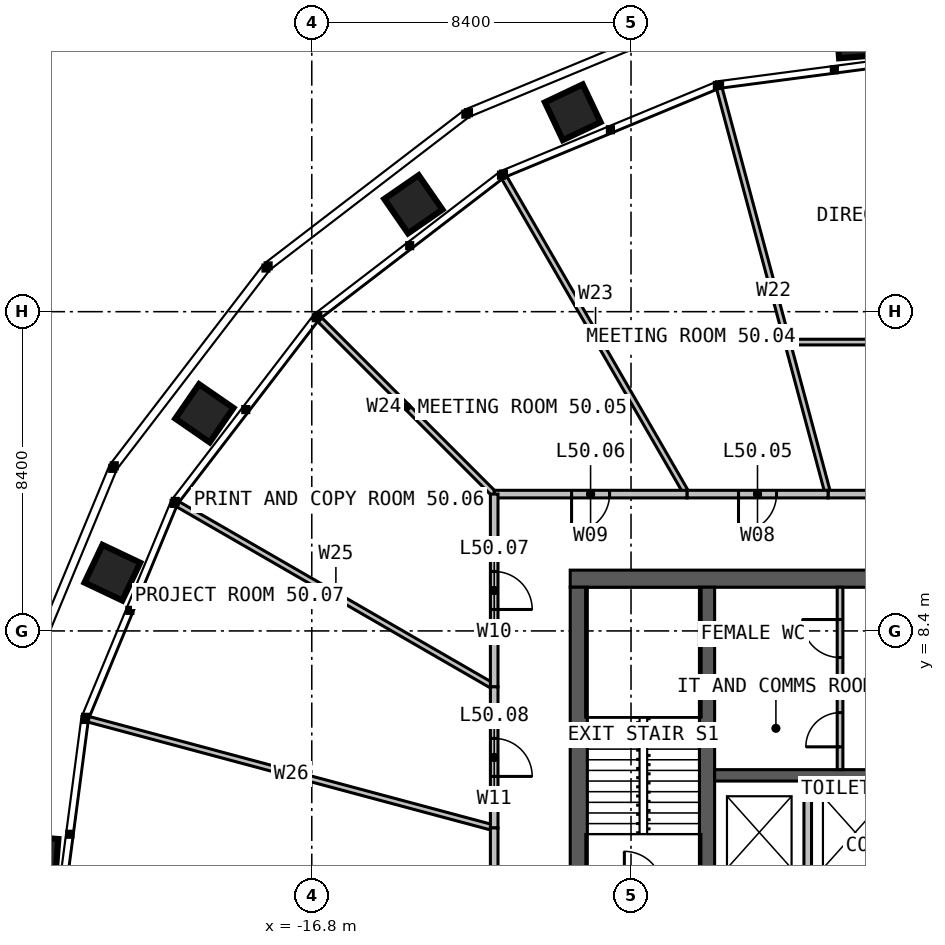
"""IFC4 building model, lengths in metres.
Left out: names, types, materials, properties, quantities, classifications, styles, units other than length and angle.
Written with IfcOpenShell. Run it as: python <this file> out.ifc"""

import sys

from ifc_helpers import new_model, si_unit, direction, frame, frame_2d, origin, place, context, subcontext, project, spatial, rectangle, extrude, element, fill, save


model = new_model("IFC4")
c1 = context("Model", 3, precision=1e-05, world=origin(), true_north=direction((0.0, 1.0)))
c2 = subcontext(c1, "Body", "Model", "MODEL_VIEW")
j1 = project(units=[si_unit("LENGTHUNIT", "METRE"), si_unit("PLANEANGLEUNIT", "RADIAN")], contexts=[c1])
p1 = place(None, origin())
s1 = spatial("IfcSite", under=j1, at=p1, CompositionType="ELEMENT")
p2 = place(p1, origin())
s2 = spatial("IfcBuilding", under=s1, at=p2, CompositionType="ELEMENT")
p3 = place(p2, frame((0.0, 0.0, 207.0)))
s3 = spatial("IfcBuildingStorey", under=s2, at=p3, CompositionType="ELEMENT", Elevation=207.0)
p4 = place(p3, frame((-10.0, 9.775, 0.0), z_axis=(0.0, 0.0, 1.0), x_axis=(1.0, 0.0, 0.0)))
e1 = element("IfcWall", 1, at=p4, inside=s3, PredefinedType="SOLIDWALL", context=c2, shape_type="SweptSolid", body=[
    extrude(rectangle(XDim=20.0, YDim=0.45, at=frame_2d((10.0, 0.0))), origin(), (0.0, 0.0, 1.0), 4.0),
])
p5 = place(p4, frame((9.4, 0.0, 0.0)))
e2 = element("IfcOpeningElement", 2, at=p5, cuts=e1, PredefinedType="OPENING", context=c2, shape_type="SweptSolid", body=[
    extrude(rectangle(XDim=1.2, YDim=2.2, at=frame_2d((0.6, 1.1))), frame((0.0, 0.235, 0.0), z_axis=(0.0, -1.0, 0.0), x_axis=(1.0, 0.0, 0.0)), (0.0, 0.0, 1.0), 0.47),
])
p6 = place(p3, frame((-9.775, 9.55, 0.0), z_axis=(0.0, 0.0, 1.0), x_axis=(0.0, -1.0, 0.0)))
e3 = element("IfcWall", 3, at=p6, inside=s3, PredefinedType="SOLIDWALL", context=c2, shape_type="SweptSolid", body=[
    extrude(rectangle(XDim=19.1, YDim=0.45, at=frame_2d((9.55, 0.0))), origin(), (0.0, 0.0, 1.0), 4.0),
])
p7 = place(p3, frame((-6.4, -9.55, 0.0), z_axis=(0.0, 0.0, 1.0), x_axis=(0.0, 1.0, 0.0)))
e4 = element("IfcWall", 4, at=p7, inside=s3, PredefinedType="SOLIDWALL", context=c2, shape_type="SweptSolid", body=[
    extrude(rectangle(XDim=19.1, YDim=0.4, at=frame_2d((9.55, 0.0))), origin(), (0.0, 0.0, 1.0), 4.0),
])
p8 = place(p7, frame((9.05, 0.0, 0.0)))
e5 = element("IfcOpeningElement", 5, at=p8, cuts=e4, PredefinedType="OPENING", context=c2, shape_type="SweptSolid", body=[
    extrude(rectangle(XDim=1.0, YDim=2.2, at=frame_2d((0.5, 1.1))), frame((0.0, 0.21, 0.0), z_axis=(0.0, -1.0, 0.0), x_axis=(1.0, 0.0, 0.0)), (0.0, 0.0, 1.0), 0.42),
])
p9 = place(p3, frame((-6.2, 4.6, 0.0), z_axis=(0.0, 0.0, 1.0), x_axis=(1.0, 0.0, 0.0)))
e6 = element("IfcWall", 6, at=p9, inside=s3, PredefinedType="SOLIDWALL", context=c2, shape_type="SweptSolid", body=[
    extrude(rectangle(XDim=4.85, YDim=0.3, at=frame_2d((2.425, 0.0))), origin(), (0.0, 0.0, 1.0), 4.0),
])
p10 = place(p3, frame((-3.75, 1.75, 0.0), z_axis=(0.0, 0.0, 1.0), x_axis=(0.0, 1.0, 0.0)))
e7 = element("IfcWall", 7, at=p10, inside=s3, PredefinedType="SOLIDWALL", context=c2, shape_type="SweptSolid", body=[
    extrude(rectangle(XDim=2.7, YDim=0.2, at=frame_2d((1.35, 0.0))), origin(), (0.0, 0.0, 1.0), 3.75),
])
p11 = place(p3, frame((-2.9, 4.75, 0.0), z_axis=(0.0, 0.0, 1.0), x_axis=(0.0, 1.0, 0.0)))
e8 = element("IfcWall", 8, at=p11, inside=s3, PredefinedType="PARTITIONING", context=c2, shape_type="SweptSolid", body=[
    extrude(rectangle(XDim=4.8, YDim=0.15, at=frame_2d((2.4, 0.0))), origin(), (0.0, 0.0, 1.0), 3.75),
])
p12 = place(p11, frame((2.95, 0.0, 0.0)))
e9 = element("IfcOpeningElement", 9, at=p12, cuts=e8, PredefinedType="OPENING", context=c2, shape_type="SweptSolid", body=[
    extrude(rectangle(XDim=1.0, YDim=2.2, at=frame_2d((0.5, 1.1))), frame((0.0, 0.085, 0.0), z_axis=(0.0, -1.0, 0.0), x_axis=(1.0, 0.0, 0.0)), (0.0, 0.0, 1.0), 0.17),
])
p13 = place(p11, frame((0.6, 0.0, 0.0)))
e10 = element("IfcOpeningElement", 10, at=p13, cuts=e8, PredefinedType="OPENING", context=c2, shape_type="SweptSolid", body=[
    extrude(rectangle(XDim=0.9, YDim=2.2, at=frame_2d((0.45, 1.1))), frame((0.0, 0.085, 0.0), z_axis=(0.0, -1.0, 0.0), x_axis=(1.0, 0.0, 0.0)), (0.0, 0.0, 1.0), 0.17),
])
p14 = place(p3, frame((-6.2, 7.0, 0.0), z_axis=(0.0, 0.0, 1.0), x_axis=(1.0, 0.0, 0.0)))
e11 = element("IfcWall", 11, at=p14, inside=s3, PredefinedType="PARTITIONING", context=c2, shape_type="SweptSolid", body=[
    extrude(rectangle(XDim=3.225, YDim=0.15, at=frame_2d((1.612, 0.0))), origin(), (0.0, 0.0, 1.0), 3.75),
])
p15 = place(p3, frame((-3.215, 12.0, 0.0), z_axis=(0.0, 0.0, 1.0), x_axis=(-0.258831035528, 0.965922613384, 0.0)))
e12 = element("IfcWall", 12, at=p15, inside=s3, PredefinedType="PARTITIONING", context=c2, shape_type="SweptSolid", body=[
    extrude(rectangle(XDim=11.053, YDim=0.15, at=frame_2d((5.526, 0.0))), origin(), (0.0, 0.0, 1.0), 2.79),
])
p16 = place(p3, frame((-6.928, 12.0, 0.0), z_axis=(0.0, 0.0, 1.0), x_axis=(-0.499990471717, 0.866030904871, 0.0)))
e13 = element("IfcWall", 13, at=p16, inside=s3, PredefinedType="PARTITIONING", context=c2, shape_type="SweptSolid", body=[
    extrude(rectangle(XDim=9.62, YDim=0.15, at=frame_2d((4.81, 0.0))), origin(), (0.0, 0.0, 1.0), 2.79),
])
p17 = place(p3, frame((-12.0, 12.0, 0.0), z_axis=(0.0, 0.0, 1.0), x_axis=(-0.707106781187, 0.707106781187, 0.0)))
e14 = element("IfcWall", 14, at=p17, inside=s3, PredefinedType="PARTITIONING", context=c2, shape_type="SweptSolid", body=[
    extrude(rectangle(XDim=6.506, YDim=0.15, at=frame_2d((3.253, 0.0))), origin(), (0.0, 0.0, 1.0), 2.79),
])
p18 = place(p3, frame((-12.0, 6.928, 0.0), z_axis=(0.0, 0.0, 1.0), x_axis=(-0.866030904871, 0.499990471717, 0.0)))
e15 = element("IfcWall", 15, at=p18, inside=s3, PredefinedType="PARTITIONING", context=c2, shape_type="SweptSolid", body=[
    extrude(rectangle(XDim=9.62, YDim=0.15, at=frame_2d((4.81, 0.0))), origin(), (0.0, 0.0, 1.0), 2.79),
])
p19 = place(p3, frame((-12.0, 3.215, 0.0), z_axis=(0.0, 0.0, 1.0), x_axis=(-0.965922613384, 0.258831035528, 0.0)))
e16 = element("IfcWall", 16, at=p19, inside=s3, PredefinedType="PARTITIONING", context=c2, shape_type="SweptSolid", body=[
    extrude(rectangle(XDim=11.053, YDim=0.15, at=frame_2d((5.526, 0.0))), origin(), (0.0, 0.0, 1.0), 2.79),
])
p20 = place(p3, frame((9.238, 16.0, 0.0), z_axis=(0.0, 0.0, 1.0), x_axis=(-1.0, 0.0, 0.0)))
e17 = element("IfcWall", 17, at=p20, inside=s3, PredefinedType="PARTITIONING", context=c2, shape_type="SweptSolid", body=[
    extrude(rectangle(XDim=13.525, YDim=0.15, at=frame_2d((6.762, 0.0))), origin(), (0.0, 0.0, 1.0), 2.79),
])
p21 = place(p20, frame((1.975, 0.0, 0.0)))
e18 = element("IfcOpeningElement", 18, at=p21, cuts=e17, PredefinedType="OPENING", context=c2, shape_type="SweptSolid", body=[
    extrude(rectangle(XDim=1.0, YDim=2.2, at=frame_2d((0.5, 1.1))), frame((0.0, 0.085, 0.0), z_axis=(0.0, -1.0, 0.0), x_axis=(1.0, 0.0, 0.0)), (0.0, 0.0, 1.0), 0.17),
])
p22 = place(p20, frame((8.338, 0.0, 0.0)))
e19 = element("IfcOpeningElement", 19, at=p22, cuts=e17, PredefinedType="OPENING", context=c2, shape_type="SweptSolid", body=[
    extrude(rectangle(XDim=1.8, YDim=2.2, at=frame_2d((0.9, 1.1))), frame((0.0, 0.085, 0.0), z_axis=(0.0, -1.0, 0.0), x_axis=(1.0, 0.0, 0.0)), (0.0, 0.0, 1.0), 0.17),
])
p23 = place(p3, frame((6.928, 12.0, 0.0), z_axis=(0.0, 0.0, 1.0), x_axis=(-1.0, 0.0, 0.0)))
e20 = element("IfcWall", 20, at=p23, inside=s3, PredefinedType="PARTITIONING", context=c2, shape_type="SweptSolid", body=[
    extrude(rectangle(XDim=10.144, YDim=0.2, at=frame_2d((5.072, 0.0))), origin(), (0.0, 0.0, 1.0), 3.8),
])
p24 = place(p23, frame((4.172, 0.0, 0.0)))
e21 = element("IfcOpeningElement", 21, at=p24, cuts=e20, PredefinedType="OPENING", context=c2, shape_type="SweptSolid", body=[
    extrude(rectangle(XDim=1.8, YDim=2.2, at=frame_2d((0.9, 1.1))), frame((0.0, 0.11, 0.0), z_axis=(0.0, -1.0, 0.0), x_axis=(1.0, 0.0, 0.0)), (0.0, 0.0, 1.0), 0.22),
])
p25 = place(p3, frame((-3.215, 12.0, 0.0), z_axis=(0.0, 0.0, 1.0), x_axis=(-1.0, 0.0, 0.0)))
e22 = element("IfcWall", 22, at=p25, inside=s3, PredefinedType="PARTITIONING", context=c2, shape_type="SweptSolid", body=[
    extrude(rectangle(XDim=3.713, YDim=0.2, at=frame_2d((1.856, 0.0))), origin(), (0.0, 0.0, 1.0), 3.8),
])
p26 = place(p25, frame((1.356, 0.0, 0.0)))
e23 = element("IfcOpeningElement", 23, at=p26, cuts=e22, PredefinedType="OPENING", context=c2, shape_type="SweptSolid", body=[
    extrude(rectangle(XDim=1.0, YDim=2.2, at=frame_2d((0.5, 1.1))), frame((0.0, 0.11, 0.0), z_axis=(0.0, -1.0, 0.0), x_axis=(1.0, 0.0, 0.0)), (0.0, 0.0, 1.0), 0.22),
])
p27 = place(p3, frame((-6.928, 12.0, 0.0), z_axis=(0.0, 0.0, 1.0), x_axis=(-1.0, 0.0, 0.0)))
e24 = element("IfcWall", 24, at=p27, inside=s3, PredefinedType="PARTITIONING", context=c2, shape_type="SweptSolid", body=[
    extrude(rectangle(XDim=5.072, YDim=0.2, at=frame_2d((2.536, 0.0))), origin(), (0.0, 0.0, 1.0), 3.8),
])
p28 = place(p27, frame((2.036, 0.0, 0.0)))
e25 = element("IfcOpeningElement", 25, at=p28, cuts=e24, PredefinedType="OPENING", context=c2, shape_type="SweptSolid", body=[
    extrude(rectangle(XDim=1.0, YDim=2.2, at=frame_2d((0.5, 1.1))), frame((0.0, 0.11, 0.0), z_axis=(0.0, -1.0, 0.0), x_axis=(1.0, 0.0, 0.0)), (0.0, 0.0, 1.0), 0.22),
])
p29 = place(p3, frame((-12.0, 12.0, 0.0), z_axis=(0.0, 0.0, 1.0), x_axis=(0.0, -1.0, 0.0)))
e26 = element("IfcWall", 26, at=p29, inside=s3, PredefinedType="PARTITIONING", context=c2, shape_type="SweptSolid", body=[
    extrude(rectangle(XDim=5.072, YDim=0.2, at=frame_2d((2.536, 0.0))), origin(), (0.0, 0.0, 1.0), 3.8),
])
p30 = place(p29, frame((2.036, 0.0, 0.0)))
e27 = element("IfcOpeningElement", 27, at=p30, cuts=e26, PredefinedType="OPENING", context=c2, shape_type="SweptSolid", body=[
    extrude(rectangle(XDim=1.0, YDim=2.2, at=frame_2d((0.5, 1.1))), frame((0.0, 0.11, 0.0), z_axis=(0.0, -1.0, 0.0), x_axis=(1.0, 0.0, 0.0)), (0.0, 0.0, 1.0), 0.22),
])
p31 = place(p3, frame((-12.0, 6.928, 0.0), z_axis=(0.0, 0.0, 1.0), x_axis=(0.0, -1.0, 0.0)))
e28 = element("IfcWall", 28, at=p31, inside=s3, PredefinedType="PARTITIONING", context=c2, shape_type="SweptSolid", body=[
    extrude(rectangle(XDim=3.713, YDim=0.2, at=frame_2d((1.856, 0.0))), origin(), (0.0, 0.0, 1.0), 3.8),
])
p32 = place(p31, frame((1.356, 0.0, 0.0)))
e29 = element("IfcOpeningElement", 29, at=p32, cuts=e28, PredefinedType="OPENING", context=c2, shape_type="SweptSolid", body=[
    extrude(rectangle(XDim=1.0, YDim=2.2, at=frame_2d((0.5, 1.1))), frame((0.0, 0.11, 0.0), z_axis=(0.0, -1.0, 0.0), x_axis=(1.0, 0.0, 0.0)), (0.0, 0.0, 1.0), 0.22),
])
p33 = place(p3, frame((-12.0, 3.215, 0.0), z_axis=(0.0, 0.0, 1.0), x_axis=(0.0, -1.0, 0.0)))
e30 = element("IfcWall", 30, at=p33, inside=s3, PredefinedType="PARTITIONING", context=c2, shape_type="SweptSolid", body=[
    extrude(rectangle(XDim=10.144, YDim=0.2, at=frame_2d((5.072, 0.0))), origin(), (0.0, 0.0, 1.0), 3.8),
])
p34 = place(p33, frame((4.172, 0.0, 0.0)))
e31 = element("IfcOpeningElement", 31, at=p34, cuts=e30, PredefinedType="OPENING", context=c2, shape_type="SweptSolid", body=[
    extrude(rectangle(XDim=1.8, YDim=2.2, at=frame_2d((0.9, 1.1))), frame((0.0, 0.11, 0.0), z_axis=(0.0, -1.0, 0.0), x_axis=(1.0, 0.0, 0.0)), (0.0, 0.0, 1.0), 0.22),
])
p35 = place(p12, origin())
e32 = element("IfcDoor", 32, at=p35, inside=s3, OperationType="SINGLE_SWING_RIGHT", PredefinedType="DOOR", context=c2, shape_type="SweptSolid", body=[
    extrude(rectangle(XDim=1.0, YDim=2.2, at=frame_2d((0.5, 1.1))), frame((0.0, 0.025, 0.0), z_axis=(0.0, -1.0, 0.0), x_axis=(1.0, 0.0, 0.0)), (0.0, 0.0, 1.0), 0.05),
])
fill(e9, e32)
p36 = place(p13, origin())
e33 = element("IfcDoor", 33, at=p36, inside=s3, OperationType="SINGLE_SWING_LEFT", PredefinedType="DOOR", context=c2, shape_type="SweptSolid", body=[
    extrude(rectangle(XDim=0.9, YDim=2.2, at=frame_2d((0.45, 1.1))), frame((0.0, 0.025, 0.0), z_axis=(0.0, -1.0, 0.0), x_axis=(1.0, 0.0, 0.0)), (0.0, 0.0, 1.0), 0.05),
])
fill(e10, e33)
p37 = place(p26, origin())
e34 = element("IfcDoor", 34, at=p37, inside=s3, OperationType="SINGLE_SWING_RIGHT", PredefinedType="DOOR", context=c2, shape_type="SweptSolid", body=[
    extrude(rectangle(XDim=1.0, YDim=2.2, at=frame_2d((0.5, 1.1))), frame((0.0, 0.025, 0.0), z_axis=(0.0, -1.0, 0.0), x_axis=(1.0, 0.0, 0.0)), (0.0, 0.0, 1.0), 0.05),
])
fill(e23, e34)
p38 = place(p28, origin())
e35 = element("IfcDoor", 35, at=p38, inside=s3, OperationType="SINGLE_SWING_RIGHT", PredefinedType="DOOR", context=c2, shape_type="SweptSolid", body=[
    extrude(rectangle(XDim=1.0, YDim=2.2, at=frame_2d((0.5, 1.1))), frame((0.0, 0.025, 0.0), z_axis=(0.0, -1.0, 0.0), x_axis=(1.0, 0.0, 0.0)), (0.0, 0.0, 1.0), 0.05),
])
fill(e25, e35)
p39 = place(p30, origin())
e36 = element("IfcDoor", 36, at=p39, inside=s3, OperationType="SINGLE_SWING_RIGHT", PredefinedType="DOOR", context=c2, shape_type="SweptSolid", body=[
    extrude(rectangle(XDim=1.0, YDim=2.2, at=frame_2d((0.5, 1.1))), frame((0.0, 0.025, 0.0), z_axis=(0.0, -1.0, 0.0), x_axis=(1.0, 0.0, 0.0)), (0.0, 0.0, 1.0), 0.05),
])
fill(e27, e36)
p40 = place(p32, origin())
e37 = element("IfcDoor", 37, at=p40, inside=s3, OperationType="SINGLE_SWING_RIGHT", PredefinedType="DOOR", context=c2, shape_type="SweptSolid", body=[
    extrude(rectangle(XDim=1.0, YDim=2.2, at=frame_2d((0.5, 1.1))), frame((0.0, 0.025, 0.0), z_axis=(0.0, -1.0, 0.0), x_axis=(1.0, 0.0, 0.0)), (0.0, 0.0, 1.0), 0.05),
])
fill(e29, e37)
save(model, sys.argv[1])
